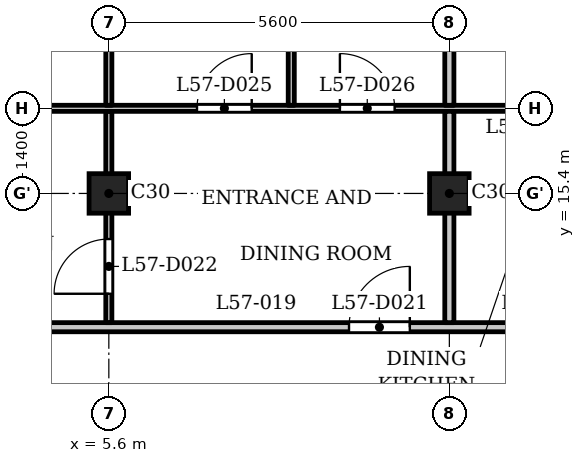
"""IFC4 building model, lengths in metres.
Left out: names, types, materials, properties, quantities, classifications, styles, units other than length and angle.
Written with IfcOpenShell. Run it as: python <this file> out.ifc"""

import sys

from ifc_helpers import new_model, si_unit, direction, frame, frame_2d, origin, origin_2d, place, context, subcontext, project, spatial, rectangle, extrude, element, fill, save


model = new_model("IFC4")
c1 = context("Model", 3, precision=1e-05, world=origin(), true_north=direction((0.0, 1.0)))
c2 = subcontext(c1, "Body", "Model", "MODEL_VIEW")
j1 = project(units=[si_unit("LENGTHUNIT", "METRE"), si_unit("PLANEANGLEUNIT", "RADIAN")], contexts=[c1])
p1 = place(None, origin())
s1 = spatial("IfcSite", under=j1, at=p1, CompositionType="ELEMENT")
p2 = place(p1, origin())
s2 = spatial("IfcBuilding", under=s1, at=p2, CompositionType="ELEMENT")
p3 = place(p2, frame((0.0, 0.0, 220.4)))
s3 = spatial("IfcBuildingStorey", under=s2, at=p3, CompositionType="ELEMENT", Elevation=220.4)
for number, where, z_axis, x_axis in (
    (1, (5.6, 15.4, 0.0), (0.0, 0.0, 1.0), (1.0, 0.0, 0.0)),
    (2, (11.2, 15.4, 0.0), (0.0, 0.0, 1.0), (1.0, 0.0, 0.0)),
):
    element("IfcColumn", number, at=place(p3, frame(where, z_axis=z_axis, x_axis=x_axis)), inside=s3, PredefinedType="COLUMN", context=c2, shape_type="SweptSolid", body=[
        extrude(rectangle(XDim=0.65, YDim=0.65, at=origin_2d()), origin(), (0.0, 0.0, 1.0), 3.5),
    ])
p4 = place(p3, frame((-17.4, 13.2, 0.0), z_axis=(0.0, 0.0, 1.0), x_axis=(1.0, 0.0, 0.0)))
e3 = element("IfcWall", 3, at=p4, inside=s3, PredefinedType="PARTITIONING", context=c2, shape_type="SweptSolid", body=[
    extrude(rectangle(XDim=34.8, YDim=0.15, at=frame_2d((17.4, 0.0))), origin(), (0.0, 0.0, 1.0), 3.2),
])
p5 = place(p4, frame((0.25, 0.0, 0.0)))
e4 = element("IfcOpeningElement", 4, at=p5, cuts=e3, PredefinedType="OPENING", context=c2, shape_type="SweptSolid", body=[
    extrude(rectangle(XDim=1.0, YDim=2.1, at=frame_2d((0.5, 1.05))), frame((0.0, 0.085, 0.0), z_axis=(0.0, -1.0, 0.0), x_axis=(1.0, 0.0, 0.0)), (0.0, 0.0, 1.0), 0.17),
])
p6 = place(p4, frame((33.65, 0.0, 0.0)))
e5 = element("IfcOpeningElement", 5, at=p6, cuts=e3, PredefinedType="OPENING", context=c2, shape_type="SweptSolid", body=[
    extrude(rectangle(XDim=1.0, YDim=2.1, at=frame_2d((0.5, 1.05))), frame((0.0, 0.085, 0.0), z_axis=(0.0, -1.0, 0.0), x_axis=(1.0, 0.0, 0.0)), (0.0, 0.0, 1.0), 0.17),
])
p7 = place(p4, frame((15.75, 0.0, 0.0)))
e6 = element("IfcOpeningElement", 6, at=p7, cuts=e3, PredefinedType="OPENING", context=c2, shape_type="SweptSolid", body=[
    extrude(rectangle(XDim=1.0, YDim=2.1, at=frame_2d((0.5, 1.05))), frame((0.0, 0.085, 0.0), z_axis=(0.0, -1.0, 0.0), x_axis=(1.0, 0.0, 0.0)), (0.0, 0.0, 1.0), 0.17),
])
p8 = place(p4, frame((26.95, 0.0, 0.0)))
e7 = element("IfcOpeningElement", 7, at=p8, cuts=e3, PredefinedType="OPENING", context=c2, shape_type="SweptSolid", body=[
    extrude(rectangle(XDim=1.0, YDim=2.1, at=frame_2d((0.5, 1.05))), frame((0.0, 0.085, 0.0), z_axis=(0.0, -1.0, 0.0), x_axis=(1.0, 0.0, 0.0)), (0.0, 0.0, 1.0), 0.17),
])
p9 = place(p4, frame((29.75, 0.0, 0.0)))
e8 = element("IfcOpeningElement", 8, at=p9, cuts=e3, PredefinedType="OPENING", context=c2, shape_type="SweptSolid", body=[
    extrude(rectangle(XDim=1.0, YDim=2.1, at=frame_2d((0.5, 1.05))), frame((0.0, 0.085, 0.0), z_axis=(0.0, -1.0, 0.0), x_axis=(1.0, 0.0, 0.0)), (0.0, 0.0, 1.0), 0.17),
])
p10 = place(p3, frame((-16.725, 16.8, 0.0), z_axis=(0.0, 0.0, 1.0), x_axis=(1.0, 0.0, 0.0)))
e9 = element("IfcWall", 9, at=p10, inside=s3, PredefinedType="PARTITIONING", context=c2, shape_type="SweptSolid", body=[
    extrude(rectangle(XDim=33.45, YDim=0.1, at=frame_2d((16.725, 0.0))), origin(), (0.0, 0.0, 1.0), 3.2),
])
p11 = place(p10, frame((11.675, 0.0, 0.0)))
e10 = element("IfcOpeningElement", 10, at=p11, cuts=e9, PredefinedType="OPENING", context=c2, shape_type="SweptSolid", body=[
    extrude(rectangle(XDim=0.9, YDim=2.1, at=frame_2d((0.45, 1.05))), frame((0.0, 0.06, 0.0), z_axis=(0.0, -1.0, 0.0), x_axis=(1.0, 0.0, 0.0)), (0.0, 0.0, 1.0), 0.12),
])
p12 = place(p10, frame((9.575, 0.0, 0.0)))
e11 = element("IfcOpeningElement", 11, at=p12, cuts=e9, PredefinedType="OPENING", context=c2, shape_type="SweptSolid", body=[
    extrude(rectangle(XDim=0.9, YDim=2.1, at=frame_2d((0.45, 1.05))), frame((0.0, 0.06, 0.0), z_axis=(0.0, -1.0, 0.0), x_axis=(1.0, 0.0, 0.0)), (0.0, 0.0, 1.0), 0.12),
])
p13 = place(p10, frame((17.375, 0.0, 0.0)))
e12 = element("IfcOpeningElement", 12, at=p13, cuts=e9, PredefinedType="OPENING", context=c2, shape_type="SweptSolid", body=[
    extrude(rectangle(XDim=0.8, YDim=2.1, at=frame_2d((0.4, 1.05))), frame((0.0, 0.06, 0.0), z_axis=(0.0, -1.0, 0.0), x_axis=(1.0, 0.0, 0.0)), (0.0, 0.0, 1.0), 0.12),
])
p14 = place(p10, frame((19.525, 0.0, 0.0)))
e13 = element("IfcOpeningElement", 13, at=p14, cuts=e9, PredefinedType="OPENING", context=c2, shape_type="SweptSolid", body=[
    extrude(rectangle(XDim=0.9, YDim=2.1, at=frame_2d((0.45, 1.05))), frame((0.0, 0.06, 0.0), z_axis=(0.0, -1.0, 0.0), x_axis=(1.0, 0.0, 0.0)), (0.0, 0.0, 1.0), 0.12),
])
p15 = place(p10, frame((23.775, 0.0, 0.0)))
e14 = element("IfcOpeningElement", 14, at=p15, cuts=e9, PredefinedType="OPENING", context=c2, shape_type="SweptSolid", body=[
    extrude(rectangle(XDim=0.9, YDim=2.1, at=frame_2d((0.45, 1.05))), frame((0.0, 0.06, 0.0), z_axis=(0.0, -1.0, 0.0), x_axis=(1.0, 0.0, 0.0)), (0.0, 0.0, 1.0), 0.12),
])
p16 = place(p10, frame((26.125, 0.0, 0.0)))
e15 = element("IfcOpeningElement", 15, at=p16, cuts=e9, PredefinedType="OPENING", context=c2, shape_type="SweptSolid", body=[
    extrude(rectangle(XDim=0.9, YDim=2.1, at=frame_2d((0.45, 1.05))), frame((0.0, 0.06, 0.0), z_axis=(0.0, -1.0, 0.0), x_axis=(1.0, 0.0, 0.0)), (0.0, 0.0, 1.0), 0.12),
])
p17 = place(p10, frame((32.075, 0.0, 0.0)))
e16 = element("IfcOpeningElement", 16, at=p17, cuts=e9, PredefinedType="OPENING", context=c2, shape_type="SweptSolid", body=[
    extrude(rectangle(XDim=0.8, YDim=2.1, at=frame_2d((0.4, 1.05))), frame((0.0, 0.06, 0.0), z_axis=(0.0, -1.0, 0.0), x_axis=(1.0, 0.0, 0.0)), (0.0, 0.0, 1.0), 0.12),
])
p18 = place(p10, frame((29.175, 0.0, 0.0)))
e17 = element("IfcOpeningElement", 17, at=p18, cuts=e9, PredefinedType="OPENING", context=c2, shape_type="SweptSolid", body=[
    extrude(rectangle(XDim=0.9, YDim=2.1, at=frame_2d((0.45, 1.05))), frame((0.0, 0.06, 0.0), z_axis=(0.0, -1.0, 0.0), x_axis=(1.0, 0.0, 0.0)), (0.0, 0.0, 1.0), 0.12),
])
p19 = place(p3, frame((5.6, 13.275, 0.0), z_axis=(0.0, 0.0, 1.0), x_axis=(0.0, 1.0, 0.0)))
e18 = element("IfcWall", 18, at=p19, inside=s3, PredefinedType="PARTITIONING", context=c2, shape_type="SweptSolid", body=[
    extrude(rectangle(XDim=3.475, YDim=0.1, at=frame_2d((1.738, 0.0))), origin(), (0.0, 0.0, 1.0), 3.2),
])
p20 = place(p19, frame((0.475, 0.0, 0.0)))
e19 = element("IfcOpeningElement", 19, at=p20, cuts=e18, PredefinedType="OPENING", context=c2, shape_type="SweptSolid", body=[
    extrude(rectangle(XDim=0.9, YDim=2.1, at=frame_2d((0.45, 1.05))), frame((0.0, 0.06, 0.0), z_axis=(0.0, -1.0, 0.0), x_axis=(1.0, 0.0, 0.0)), (0.0, 0.0, 1.0), 0.12),
])
p21 = place(p3, frame((5.6, 16.85, 0.0), z_axis=(0.0, 0.0, 1.0), x_axis=(0.0, 1.0, 0.0)))
e20 = element("IfcWall", 20, at=p21, inside=s3, PredefinedType="PARTITIONING", context=c2, shape_type="SweptSolid", body=[
    extrude(rectangle(XDim=5.23, YDim=0.1, at=frame_2d((2.615, 0.0))), origin(), (0.0, 0.0, 1.0), 3.2),
])
p22 = place(p3, frame((8.6, 16.85, 0.0), z_axis=(0.0, 0.0, 1.0), x_axis=(0.0, 1.0, 0.0)))
e21 = element("IfcWall", 21, at=p22, inside=s3, PredefinedType="PARTITIONING", context=c2, shape_type="SweptSolid", body=[
    extrude(rectangle(XDim=5.955, YDim=0.1, at=frame_2d((2.978, 0.0))), origin(), (0.0, 0.0, 1.0), 3.2),
])
p23 = place(p3, frame((11.2, 13.275, 0.0), z_axis=(0.0, 0.0, 1.0), x_axis=(0.0, 1.0, 0.0)))
e22 = element("IfcWall", 22, at=p23, inside=s3, PredefinedType="PARTITIONING", context=c2, shape_type="SweptSolid", body=[
    extrude(rectangle(XDim=3.475, YDim=0.15, at=frame_2d((1.738, 0.0))), origin(), (0.0, 0.0, 1.0), 3.2),
])
p24 = place(p3, frame((11.2, 16.85, 0.0), z_axis=(0.0, 0.0, 1.0), x_axis=(0.0, 1.0, 0.0)))
e23 = element("IfcWall", 23, at=p24, inside=s3, PredefinedType="PARTITIONING", context=c2, shape_type="SweptSolid", body=[
    extrude(rectangle(XDim=5.23, YDim=0.15, at=frame_2d((2.615, 0.0))), origin(), (0.0, 0.0, 1.0), 3.2),
])
p25 = place(p8, origin())
e24 = element("IfcDoor", 24, at=p25, inside=s3, OperationType="SINGLE_SWING_LEFT", PredefinedType="DOOR", context=c2, shape_type="SweptSolid", body=[
    extrude(rectangle(XDim=1.0, YDim=2.1, at=frame_2d((0.5, 1.05))), frame((0.0, 0.025, 0.0), z_axis=(0.0, -1.0, 0.0), x_axis=(1.0, 0.0, 0.0)), (0.0, 0.0, 1.0), 0.05),
])
fill(e7, e24)
p26 = place(p20, origin())
e25 = element("IfcDoor", 25, at=p26, inside=s3, OperationType="SINGLE_SWING_RIGHT", PredefinedType="DOOR", context=c2, shape_type="SweptSolid", body=[
    extrude(rectangle(XDim=0.9, YDim=2.1, at=frame_2d((0.45, 1.05))), frame((0.0, 0.025, 0.0), z_axis=(0.0, -1.0, 0.0), x_axis=(1.0, 0.0, 0.0)), (0.0, 0.0, 1.0), 0.05),
])
fill(e19, e25)
p27 = place(p15, origin())
e26 = element("IfcDoor", 26, at=p27, inside=s3, OperationType="SINGLE_SWING_LEFT", PredefinedType="DOOR", context=c2, shape_type="SweptSolid", body=[
    extrude(rectangle(XDim=0.9, YDim=2.1, at=frame_2d((0.45, 1.05))), frame((0.0, 0.025, 0.0), z_axis=(0.0, -1.0, 0.0), x_axis=(1.0, 0.0, 0.0)), (0.0, 0.0, 1.0), 0.05),
])
fill(e14, e26)
p28 = place(p16, origin())
e27 = element("IfcDoor", 27, at=p28, inside=s3, OperationType="SINGLE_SWING_RIGHT", PredefinedType="DOOR", context=c2, shape_type="SweptSolid", body=[
    extrude(rectangle(XDim=0.9, YDim=2.1, at=frame_2d((0.45, 1.05))), frame((0.0, 0.025, 0.0), z_axis=(0.0, -1.0, 0.0), x_axis=(1.0, 0.0, 0.0)), (0.0, 0.0, 1.0), 0.05),
])
fill(e15, e27)
save(model, sys.argv[1])
